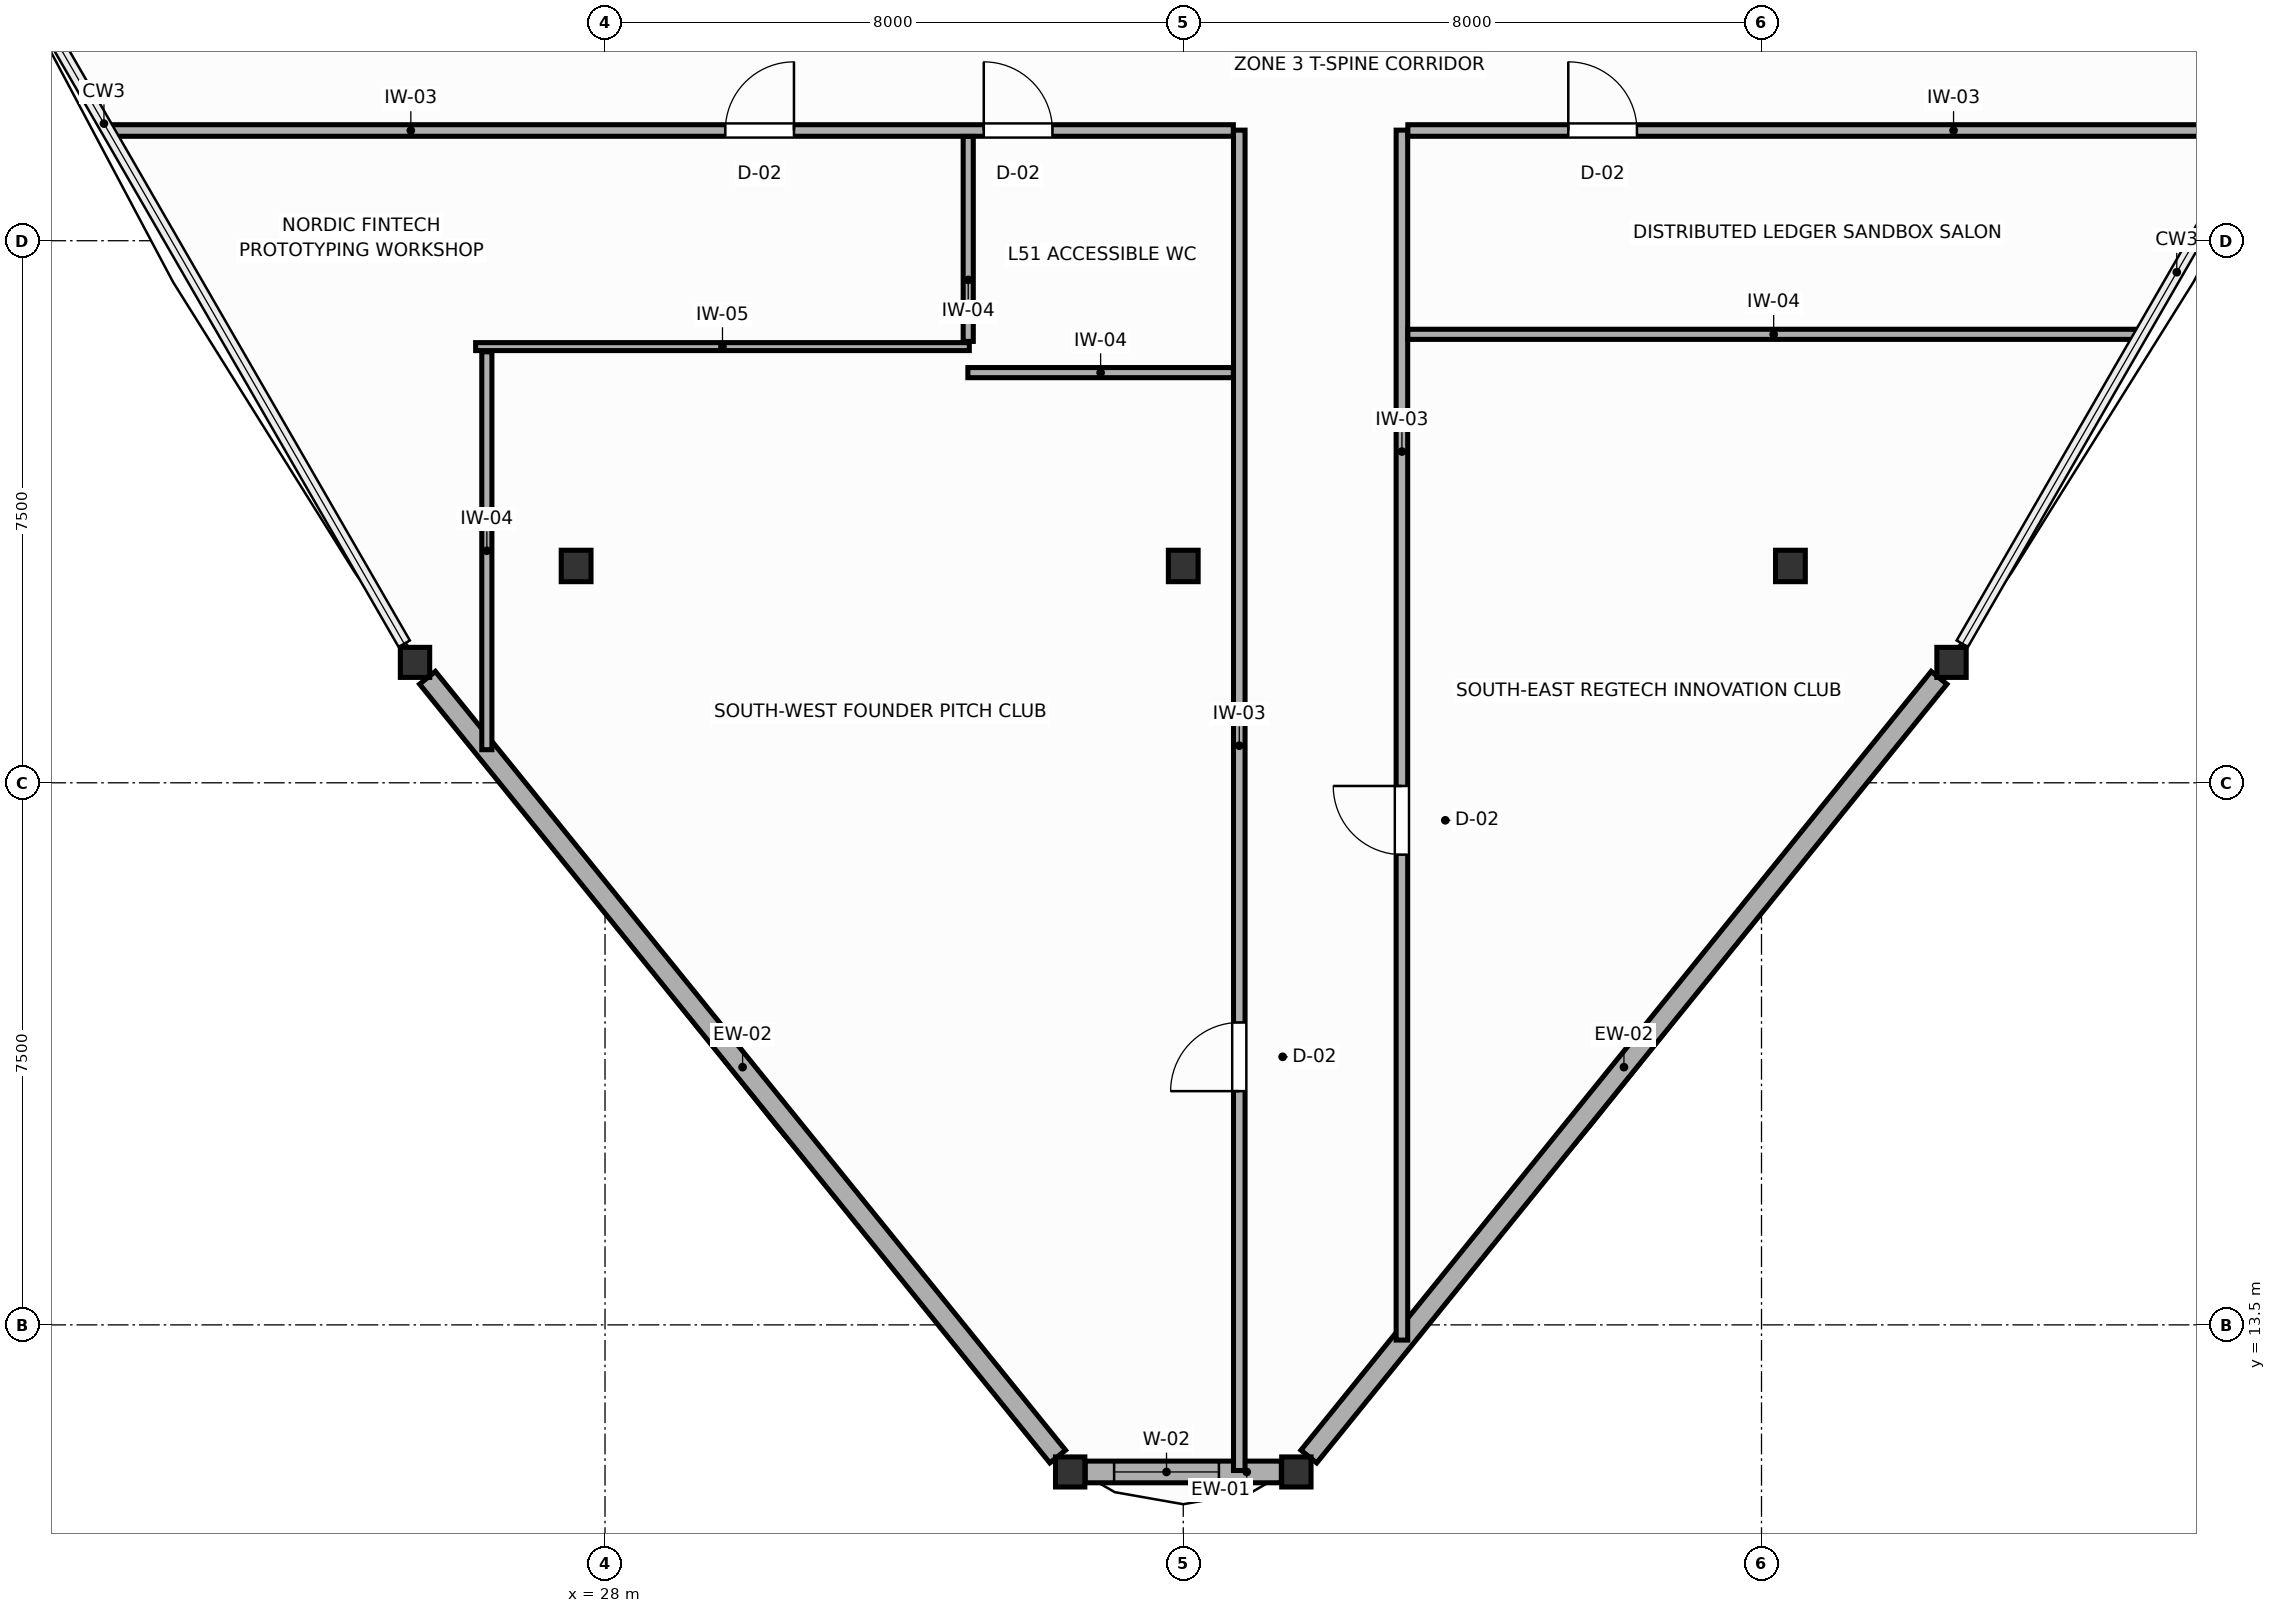
"""IFC4 building model, lengths in metres.
Left out: names, types, materials, properties, quantities, classifications, styles, units other than length and angle.
Written with IfcOpenShell. Run it as: python <this file> out.ifc"""

import sys

from ifc_helpers import new_model, si_unit, direction, frame, frame_2d, origin, origin_2d, place, context, subcontext, project, spatial, rectangle, i_section, extrude, source, transform, mapped, element, fill, save


model = new_model("IFC4")
c1 = context("Model", 3, precision=1e-05, world=origin(), true_north=direction((0.0, 1.0)))
c2 = subcontext(c1, "Body", "Model", "MODEL_VIEW")
j1 = project(units=[si_unit("LENGTHUNIT", "METRE"), si_unit("PLANEANGLEUNIT", "RADIAN")], contexts=[c1])
p1 = place(None, origin())
s1 = spatial("IfcSite", under=j1, at=p1, CompositionType="ELEMENT")
p2 = place(p1, origin())
s2 = spatial("IfcBuilding", under=s1, at=p2, CompositionType="ELEMENT")
p3 = place(p2, frame((0.0, 0.0, 197.4)))
s3 = spatial("IfcBuildingStorey", under=s2, at=p3, CompositionType="ELEMENT", Elevation=197.4)
m1 = source(origin(), c2, "Body", "SweptSolid", [
    extrude(i_section(OverallWidth=0.412, OverallDepth=0.435, WebThickness=0.033, FlangeThickness=0.053, FilletRadius=0.015, at=origin_2d()), origin(), (0.0, 0.0, 1.0), 3.6),
])
for number, where, z_axis, x_axis in (
    (1, (27.6, 24.0, 0.0), (0.0, 0.0, 1.0), (1.0, 0.0, 0.0)),
    (2, (44.4, 24.0, 0.0), (0.0, 0.0, 1.0), (1.0, 0.0, 0.0)),
    (3, (36.0, 24.0, 0.0), (0.0, 0.0, 1.0), (1.0, 0.0, 0.0)),
):
    element("IfcColumn", number, at=place(p3, frame(where, z_axis=z_axis, x_axis=x_axis)), inside=s3, PredefinedType="COLUMN", context=c2, shape_type="MappedRepresentation", body=[
        mapped(m1, transform((0.0, 0.0, 0.0), scale=1.0)),
    ])
m2 = source(origin(), c2, "Body", "SweptSolid", [
    extrude(i_section(OverallWidth=0.406, OverallDepth=0.416, WebThickness=0.027, FlangeThickness=0.044, FilletRadius=0.015, at=origin_2d()), origin(), (0.0, 0.0, 1.0), 3.6),
])
for number, where, z_axis, x_axis in (
    (4, (25.371, 22.666, 0.0), (0.0, 0.0, 1.0), (1.0, 0.0, 0.0)),
    (5, (34.435, 11.465, 0.0), (0.0, 0.0, 1.0), (1.0, 0.0, 0.0)),
    (6, (37.565, 11.465, 0.0), (0.0, 0.0, 1.0), (1.0, 0.0, 0.0)),
    (7, (46.629, 22.666, 0.0), (0.0, 0.0, 1.0), (1.0, 0.0, 0.0)),
):
    element("IfcColumn", number, at=place(p3, frame(where, z_axis=z_axis, x_axis=x_axis)), inside=s3, PredefinedType="COLUMN", context=c2, shape_type="MappedRepresentation", body=[
        mapped(m2, transform((0.0, 0.0, 0.0), scale=1.0)),
    ])
p4 = place(p3, frame((25.544, 22.453, 0.0), z_axis=(0.0, 0.0, 1.0), x_axis=(0.629045703635, -0.777368318584, 0.0)))
e8 = element("IfcWall", 8, at=p4, inside=s3, PredefinedType="SOLIDWALL", context=c2, shape_type="SweptSolid", body=[
    extrude(rectangle(XDim=13.861, YDim=0.28, at=frame_2d((6.931, 0.0))), origin(), (0.0, 0.0, 1.0), 2.87),
])
p5 = place(p3, frame((34.643, 11.465, 0.0), z_axis=(0.0, 0.0, 1.0), x_axis=(1.0, 0.0, 0.0)))
e9 = element("IfcWall", 9, at=p5, inside=s3, PredefinedType="SOLIDWALL", context=c2, shape_type="SweptSolid", body=[
    extrude(rectangle(XDim=2.713, YDim=0.3, at=frame_2d((1.357, 0.0))), origin(), (0.0, 0.0, 1.0), 2.87),
])
p6 = place(p5, frame((0.4, 0.0, 0.75)))
e10 = element("IfcOpeningElement", 10, at=p6, cuts=e9, PredefinedType="OPENING", context=c2, shape_type="SweptSolid", body=[
    extrude(rectangle(XDim=1.45, YDim=1.65, at=frame_2d((0.725, 0.825))), frame((0.0, 0.16, 0.0), z_axis=(0.0, -1.0, 0.0), x_axis=(1.0, 0.0, 0.0)), (0.0, 0.0, 1.0), 0.32),
])
p7 = place(p3, frame((37.737, 11.678, 0.0), z_axis=(0.0, 0.0, 1.0), x_axis=(0.629045703635, 0.777368318584, 0.0)))
e11 = element("IfcWall", 11, at=p7, inside=s3, PredefinedType="SOLIDWALL", context=c2, shape_type="SweptSolid", body=[
    extrude(rectangle(XDim=13.861, YDim=0.28, at=frame_2d((6.931, 0.0))), origin(), (0.0, 0.0, 1.0), 2.87),
])
p8 = place(p3, frame((36.775, 11.485, 0.0), z_axis=(0.0, 0.0, 1.0), x_axis=(0.0, 1.0, 0.0)))
e12 = element("IfcWall", 12, at=p8, inside=s3, PredefinedType="PARTITIONING", context=c2, shape_type="SweptSolid", body=[
    extrude(rectangle(XDim=18.545, YDim=0.16, at=frame_2d((9.272, 0.0))), origin(), (0.0, 0.0, 1.0), 2.81),
])
p9 = place(p8, frame((5.249, 0.0, 0.0)))
e13 = element("IfcOpeningElement", 13, at=p9, cuts=e12, PredefinedType="OPENING", context=c2, shape_type="SweptSolid", body=[
    extrude(rectangle(XDim=0.95, YDim=2.05, at=frame_2d((0.475, 1.025))), frame((0.0, 0.09, 0.0), z_axis=(0.0, -1.0, 0.0), x_axis=(1.0, 0.0, 0.0)), (0.0, 0.0, 1.0), 0.18),
])
p10 = place(p3, frame((39.025, 13.29, 0.0), z_axis=(0.0, 0.0, 1.0), x_axis=(0.0, 1.0, 0.0)))
e14 = element("IfcWall", 14, at=p10, inside=s3, PredefinedType="PARTITIONING", context=c2, shape_type="SweptSolid", body=[
    extrude(rectangle(XDim=16.74, YDim=0.16, at=frame_2d((8.37, 0.0))), origin(), (0.0, 0.0, 1.0), 3.26),
])
p11 = place(p10, frame((6.716, 0.0, 0.0)))
e15 = element("IfcOpeningElement", 15, at=p11, cuts=e14, PredefinedType="OPENING", context=c2, shape_type="SweptSolid", body=[
    extrude(rectangle(XDim=0.95, YDim=2.05, at=frame_2d((0.475, 1.025))), frame((0.0, 0.09, 0.0), z_axis=(0.0, -1.0, 0.0), x_axis=(1.0, 0.0, 0.0)), (0.0, 0.0, 1.0), 0.18),
])
p12 = place(p3, frame((21.143, 30.025, 0.0), z_axis=(0.0, 0.0, 1.0), x_axis=(1.0, 0.0, 0.0)))
e16 = element("IfcWall", 16, at=p12, inside=s3, PredefinedType="PARTITIONING", context=c2, shape_type="SweptSolid", body=[
    extrude(rectangle(XDim=15.551, YDim=0.16, at=frame_2d((7.775, 0.0))), origin(), (0.0, 0.0, 1.0), 3.26),
])
p13 = place(p12, frame((12.097, 0.0, 0.0)))
e17 = element("IfcOpeningElement", 17, at=p13, cuts=e16, PredefinedType="OPENING", context=c2, shape_type="SweptSolid", body=[
    extrude(rectangle(XDim=0.95, YDim=2.05, at=frame_2d((0.475, 1.025))), frame((0.0, 0.09, 0.0), z_axis=(0.0, -1.0, 0.0), x_axis=(1.0, 0.0, 0.0)), (0.0, 0.0, 1.0), 0.18),
])
p14 = place(p12, frame((8.521, 0.0, 0.0)))
e18 = element("IfcOpeningElement", 18, at=p14, cuts=e16, PredefinedType="OPENING", context=c2, shape_type="SweptSolid", body=[
    extrude(rectangle(XDim=0.95, YDim=2.05, at=frame_2d((0.475, 1.025))), frame((0.0, 0.09, 0.0), z_axis=(0.0, -1.0, 0.0), x_axis=(1.0, 0.0, 0.0)), (0.0, 0.0, 1.0), 0.18),
])
p15 = place(p3, frame((39.107, 30.025, 0.0), z_axis=(0.0, 0.0, 1.0), x_axis=(1.0, 0.0, 0.0)))
e19 = element("IfcWall", 19, at=p15, inside=s3, PredefinedType="PARTITIONING", context=c2, shape_type="SweptSolid", body=[
    extrude(rectangle(XDim=11.75, YDim=0.16, at=frame_2d((5.875, 0.0))), origin(), (0.0, 0.0, 1.0), 3.26),
])
p16 = place(p15, frame((2.22, 0.0, 0.0)))
e20 = element("IfcOpeningElement", 20, at=p16, cuts=e19, PredefinedType="OPENING", context=c2, shape_type="SweptSolid", body=[
    extrude(rectangle(XDim=0.95, YDim=2.05, at=frame_2d((0.475, 1.025))), frame((0.0, 0.09, 0.0), z_axis=(0.0, -1.0, 0.0), x_axis=(1.0, 0.0, 0.0)), (0.0, 0.0, 1.0), 0.18),
])
p17 = place(p3, frame((39.107, 27.205, 0.0), z_axis=(0.0, 0.0, 1.0), x_axis=(1.0, 0.0, 0.0)))
e21 = element("IfcWall", 21, at=p17, inside=s3, PredefinedType="PARTITIONING", context=c2, shape_type="SweptSolid", body=[
    extrude(rectangle(XDim=10.122, YDim=0.14, at=frame_2d((5.061, 0.0))), origin(), (0.0, 0.0, 1.0), 3.26),
])
p18 = place(p3, frame((26.21, 27.035, 0.0), z_axis=(0.0, 0.0, 1.0), x_axis=(1.0, 0.0, 0.0)))
e22 = element("IfcWall", 22, at=p18, inside=s3, PredefinedType="MOVABLE", context=c2, shape_type="SweptSolid", body=[
    extrude(rectangle(XDim=6.83, YDim=0.11, at=frame_2d((3.415, 0.0))), origin(), (0.0, 0.0, 1.0), 3.26),
])
p19 = place(p3, frame((26.365, 21.458, 0.0), z_axis=(0.0, 0.0, 1.0), x_axis=(0.0, 1.0, 0.0)))
e23 = element("IfcWall", 23, at=p19, inside=s3, PredefinedType="PARTITIONING", context=c2, shape_type="SweptSolid", body=[
    extrude(rectangle(XDim=5.505, YDim=0.14, at=frame_2d((2.752, 0.0))), origin(), (0.0, 0.0, 1.0), 3.26),
])
p20 = place(p3, frame((33.02, 26.675, 0.0), z_axis=(0.0, 0.0, 1.0), x_axis=(1.0, 0.0, 0.0)))
e24 = element("IfcWall", 24, at=p20, inside=s3, PredefinedType="PARTITIONING", context=c2, shape_type="SweptSolid", body=[
    extrude(rectangle(XDim=3.673, YDim=0.14, at=frame_2d((1.836, 0.0))), origin(), (0.0, 0.0, 1.0), 3.26),
])
p21 = place(p3, frame((33.025, 27.107, 0.0), z_axis=(0.0, 0.0, 1.0), x_axis=(0.0, 1.0, 0.0)))
e25 = element("IfcWall", 25, at=p21, inside=s3, PredefinedType="PARTITIONING", context=c2, shape_type="SweptSolid", body=[
    extrude(rectangle(XDim=2.836, YDim=0.14, at=frame_2d((1.418, 0.0))), origin(), (0.0, 0.0, 1.0), 3.26),
])
p22 = place(p6, origin())
e26 = element("IfcWindow", 26, at=p22, inside=s3, PartitioningType="SINGLE_PANEL", PredefinedType="WINDOW", context=c2, shape_type="SweptSolid", body=[
    extrude(rectangle(XDim=1.45, YDim=1.65, at=frame_2d((0.725, 0.825))), frame((0.0, 0.03, 0.0), z_axis=(0.0, -1.0, 0.0), x_axis=(1.0, 0.0, 0.0)), (0.0, 0.0, 1.0), 0.06),
])
fill(e10, e26)
p23 = place(p9, origin())
e27 = element("IfcDoor", 27, at=p23, inside=s3, OperationType="SINGLE_SWING_LEFT", PredefinedType="DOOR", context=c2, shape_type="SweptSolid", body=[
    extrude(rectangle(XDim=0.95, YDim=2.05, at=frame_2d((0.475, 1.025))), frame((0.0, 0.025, 0.0), z_axis=(0.0, -1.0, 0.0), x_axis=(1.0, 0.0, 0.0)), (0.0, 0.0, 1.0), 0.05),
])
fill(e13, e27)
p24 = place(p11, origin())
e28 = element("IfcDoor", 28, at=p24, inside=s3, OperationType="SINGLE_SWING_RIGHT", PredefinedType="DOOR", context=c2, shape_type="SweptSolid", body=[
    extrude(rectangle(XDim=0.95, YDim=2.05, at=frame_2d((0.475, 1.025))), frame((0.0, 0.025, 0.0), z_axis=(0.0, -1.0, 0.0), x_axis=(1.0, 0.0, 0.0)), (0.0, 0.0, 1.0), 0.05),
])
fill(e15, e28)
p25 = place(p13, origin())
e29 = element("IfcDoor", 29, at=p25, inside=s3, OperationType="SINGLE_SWING_LEFT", PredefinedType="DOOR", context=c2, shape_type="SweptSolid", body=[
    extrude(rectangle(XDim=0.95, YDim=2.05, at=frame_2d((0.475, 1.025))), frame((0.0, 0.025, 0.0), z_axis=(0.0, -1.0, 0.0), x_axis=(1.0, 0.0, 0.0)), (0.0, 0.0, 1.0), 0.05),
])
fill(e17, e29)
p26 = place(p14, origin())
e30 = element("IfcDoor", 30, at=p26, inside=s3, OperationType="SINGLE_SWING_RIGHT", PredefinedType="DOOR", context=c2, shape_type="SweptSolid", body=[
    extrude(rectangle(XDim=0.95, YDim=2.05, at=frame_2d((0.475, 1.025))), frame((0.0, 0.025, 0.0), z_axis=(0.0, -1.0, 0.0), x_axis=(1.0, 0.0, 0.0)), (0.0, 0.0, 1.0), 0.05),
])
fill(e18, e30)
p27 = place(p16, origin())
e31 = element("IfcDoor", 31, at=p27, inside=s3, OperationType="SINGLE_SWING_LEFT", PredefinedType="DOOR", context=c2, shape_type="SweptSolid", body=[
    extrude(rectangle(XDim=0.95, YDim=2.05, at=frame_2d((0.475, 1.025))), frame((0.0, 0.025, 0.0), z_axis=(0.0, -1.0, 0.0), x_axis=(1.0, 0.0, 0.0)), (0.0, 0.0, 1.0), 0.05),
])
fill(e20, e31)
save(model, sys.argv[1])
